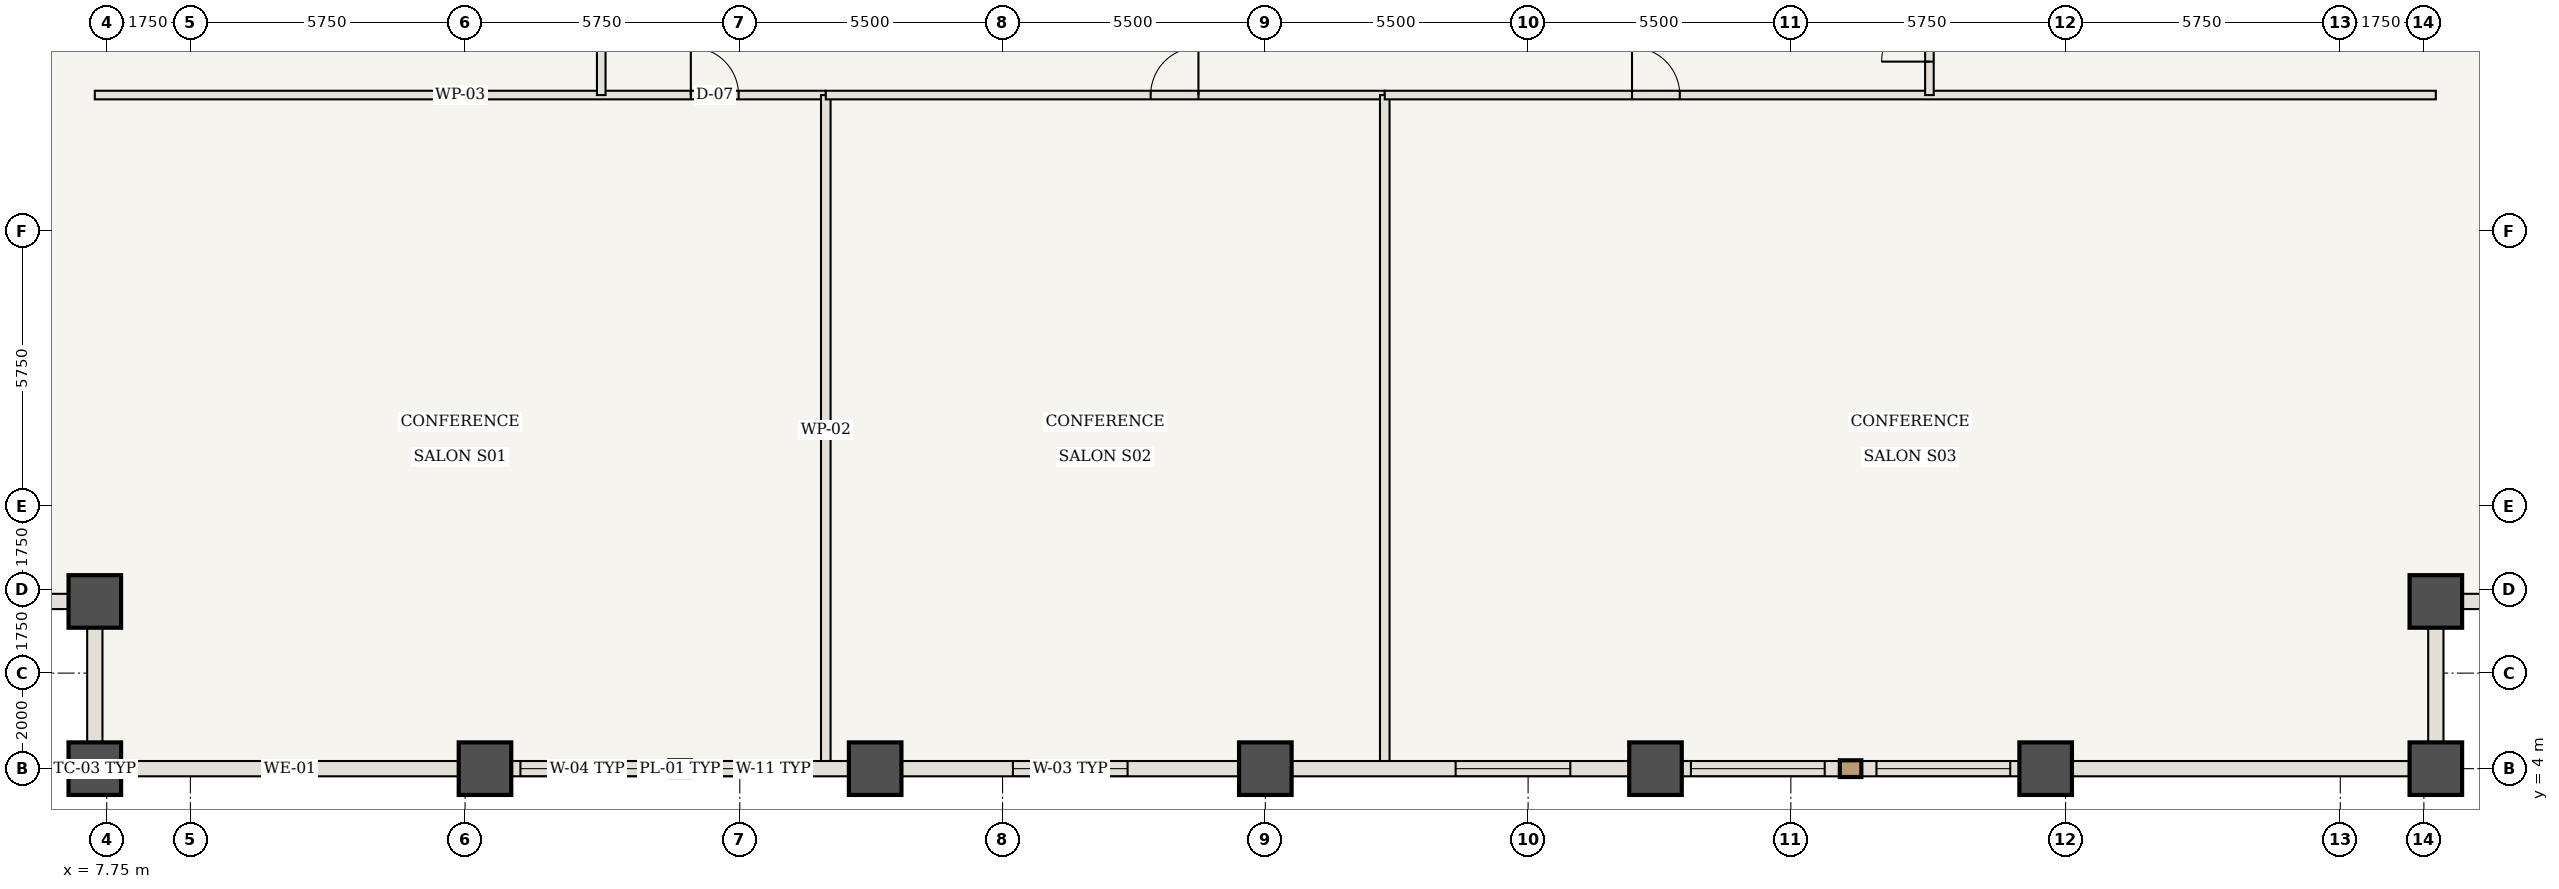
"""IFC4 building model, lengths in metres.
Left out: names, types, materials, properties, quantities, classifications, styles, units other than length and angle.
Written with IfcOpenShell. Run it as: python <this file> out.ifc"""

import sys

from ifc_helpers import new_model, si_unit, direction, frame, frame_2d, origin, origin_2d, place, context, subcontext, project, spatial, rectangle, extrude, element, fill, save


model = new_model("IFC4")
c1 = context("Model", 3, precision=1e-05, world=origin(), true_north=direction((0.0, 1.0)))
c2 = subcontext(c1, "Body", "Model", "MODEL_VIEW")
j1 = project(units=[si_unit("LENGTHUNIT", "METRE"), si_unit("PLANEANGLEUNIT", "RADIAN")], contexts=[c1])
p1 = place(None, origin())
s1 = spatial("IfcSite", under=j1, at=p1, CompositionType="ELEMENT")
p2 = place(p1, origin())
s2 = spatial("IfcBuilding", under=s1, at=p2, CompositionType="ELEMENT")
p3 = place(p2, frame((0.0, 0.0, 52.85)))
s3 = spatial("IfcBuildingStorey", under=s2, at=p3, CompositionType="ELEMENT", Elevation=52.85)
for number, where, z_axis, x_axis in (
    (1, (7.5, 4.0, 0.0), (0.0, 0.0, 1.0), (1.0, 0.0, 0.0)),
    (2, (7.5, 7.5, 0.0), (0.0, 0.0, 1.0), (1.0, 0.0, 0.0)),
    (3, (56.5, 4.0, 0.0), (0.0, 0.0, 1.0), (1.0, 0.0, 0.0)),
    (4, (56.5, 7.5, 0.0), (0.0, 0.0, 1.0), (1.0, 0.0, 0.0)),
    (5, (15.667, 4.0, 0.0), (0.0, 0.0, 1.0), (1.0, 0.0, 0.0)),
    (6, (23.833, 4.0, 0.0), (0.0, 0.0, 1.0), (1.0, 0.0, 0.0)),
    (7, (32.0, 4.0, 0.0), (0.0, 0.0, 1.0), (1.0, 0.0, 0.0)),
    (8, (40.167, 4.0, 0.0), (0.0, 0.0, 1.0), (1.0, 0.0, 0.0)),
    (9, (48.333, 4.0, 0.0), (0.0, 0.0, 1.0), (1.0, 0.0, 0.0)),
):
    element("IfcColumn", number, at=place(p3, frame(where, z_axis=z_axis, x_axis=x_axis)), inside=s3, PredefinedType="COLUMN", context=c2, shape_type="SweptSolid", body=[
        extrude(rectangle(XDim=1.1, YDim=1.1, at=origin_2d()), origin(), (0.0, 0.0, 1.0), 3.5),
    ])
p4 = place(p3, frame((7.5, 18.1, 0.0), z_axis=(0.0, 0.0, 1.0), x_axis=(1.0, 0.0, 0.0)))
e10 = element("IfcWall", 10, at=p4, inside=s3, PredefinedType="STANDARD", context=c2, shape_type="SweptSolid", body=[
    extrude(rectangle(XDim=15.3, YDim=0.18, at=frame_2d((7.65, 0.0))), origin(), (0.0, 0.0, 1.0), 3.32),
])
p5 = place(p4, frame((12.475, 0.0, 0.0)))
e11 = element("IfcOpeningElement", 11, at=p5, cuts=e10, PredefinedType="OPENING", context=c2, shape_type="SweptSolid", body=[
    extrude(rectangle(XDim=1.0, YDim=2.15, at=frame_2d((0.5, 1.075))), frame((0.0, 0.1, 0.0), z_axis=(0.0, -1.0, 0.0), x_axis=(1.0, 0.0, 0.0)), (0.0, 0.0, 1.0), 0.2),
])
p6 = place(p3, frame((22.8, 4.06, 0.0), z_axis=(0.0, 0.0, 1.0), x_axis=(0.0, 1.0, 0.0)))
e12 = element("IfcWall", 12, at=p6, inside=s3, PredefinedType="STANDARD", context=c2, shape_type="SweptSolid", body=[
    extrude(rectangle(XDim=14.04, YDim=0.2, at=frame_2d((7.02, 0.0))), origin(), (0.0, 0.0, 1.0), 3.32),
])
p7 = place(p3, frame((22.8, 18.1, 0.0), z_axis=(0.0, 0.0, 1.0), x_axis=(1.0, 0.0, 0.0)))
e13 = element("IfcWall", 13, at=p7, inside=s3, PredefinedType="STANDARD", context=c2, shape_type="SweptSolid", body=[
    extrude(rectangle(XDim=11.7, YDim=0.18, at=frame_2d((5.85, 0.0))), origin(), (0.0, 0.0, 1.0), 3.32),
])
p8 = place(p7, frame((6.8, 0.0, 0.0)))
e14 = element("IfcOpeningElement", 14, at=p8, cuts=e13, PredefinedType="OPENING", context=c2, shape_type="SweptSolid", body=[
    extrude(rectangle(XDim=1.0, YDim=2.15, at=frame_2d((0.5, 1.075))), frame((0.0, 0.1, 0.0), z_axis=(0.0, -1.0, 0.0), x_axis=(1.0, 0.0, 0.0)), (0.0, 0.0, 1.0), 0.2),
])
p9 = place(p3, frame((34.5, 4.06, 0.0), z_axis=(0.0, 0.0, 1.0), x_axis=(0.0, 1.0, 0.0)))
e15 = element("IfcWall", 15, at=p9, inside=s3, PredefinedType="STANDARD", context=c2, shape_type="SweptSolid", body=[
    extrude(rectangle(XDim=14.04, YDim=0.2, at=frame_2d((7.02, 0.0))), origin(), (0.0, 0.0, 1.0), 3.32),
])
p10 = place(p3, frame((34.5, 18.1, 0.0), z_axis=(0.0, 0.0, 1.0), x_axis=(1.0, 0.0, 0.0)))
e16 = element("IfcWall", 16, at=p10, inside=s3, PredefinedType="STANDARD", context=c2, shape_type="SweptSolid", body=[
    extrude(rectangle(XDim=22.0, YDim=0.18, at=frame_2d((11.0, 0.0))), origin(), (0.0, 0.0, 1.0), 3.32),
])
p11 = place(p10, frame((5.175, 0.0, 0.0)))
e17 = element("IfcOpeningElement", 17, at=p11, cuts=e16, PredefinedType="OPENING", context=c2, shape_type="SweptSolid", body=[
    extrude(rectangle(XDim=1.0, YDim=2.15, at=frame_2d((0.5, 1.075))), frame((0.0, 0.1, 0.0), z_axis=(0.0, -1.0, 0.0), x_axis=(1.0, 0.0, 0.0)), (0.0, 0.0, 1.0), 0.2),
])
p12 = place(p3, frame((18.1, 18.1, 0.0), z_axis=(0.0, 0.0, 1.0), x_axis=(0.0, 1.0, 0.0)))
e18 = element("IfcWall", 18, at=p12, inside=s3, PredefinedType="STANDARD", context=c2, shape_type="SweptSolid", body=[
    extrude(rectangle(XDim=10.9, YDim=0.18, at=frame_2d((5.45, 0.0))), origin(), (0.0, 0.0, 1.0), 3.32),
])
p13 = place(p12, frame((4.95, 0.0, 0.0)))
e19 = element("IfcOpeningElement", 19, at=p13, cuts=e18, PredefinedType="OPENING", context=c2, shape_type="SweptSolid", body=[
    extrude(rectangle(XDim=1.0, YDim=2.15, at=frame_2d((0.5, 1.075))), frame((0.0, 0.1, 0.0), z_axis=(0.0, -1.0, 0.0), x_axis=(1.0, 0.0, 0.0)), (0.0, 0.0, 1.0), 0.2),
])
p14 = place(p3, frame((45.9, 18.1, 0.0), z_axis=(0.0, 0.0, 1.0), x_axis=(0.0, 1.0, 0.0)))
e20 = element("IfcWall", 20, at=p14, inside=s3, PredefinedType="STANDARD", context=c2, shape_type="SweptSolid", body=[
    extrude(rectangle(XDim=5.3, YDim=0.18, at=frame_2d((2.65, 0.0))), origin(), (0.0, 0.0, 1.0), 3.32),
])
p15 = place(p14, frame((0.7, 0.0, 0.0)))
e21 = element("IfcOpeningElement", 21, at=p15, cuts=e20, PredefinedType="OPENING", context=c2, shape_type="SweptSolid", body=[
    extrude(rectangle(XDim=1.0, YDim=2.15, at=frame_2d((0.5, 1.075))), frame((0.0, 0.1, 0.0), z_axis=(0.0, -1.0, 0.0), x_axis=(1.0, 0.0, 0.0)), (0.0, 0.0, 1.0), 0.2),
])
p16 = place(p3, frame((15.667, 4.0, 0.0), z_axis=(0.0, 0.0, 1.0), x_axis=(-1.0, 0.0, 0.0)))
e22 = element("IfcWall", 22, at=p16, inside=s3, PredefinedType="USERDEFINED", context=c2, shape_type="SweptSolid", body=[
    extrude(rectangle(XDim=8.167, YDim=0.32, at=frame_2d((4.083, 0.0))), origin(), (0.0, 0.0, 1.0), 2.52),
])
p17 = place(p3, frame((23.833, 4.0, 0.0), z_axis=(0.0, 0.0, 1.0), x_axis=(-1.0, 0.0, 0.0)))
e23 = element("IfcWall", 23, at=p17, inside=s3, PredefinedType="USERDEFINED", context=c2, shape_type="SweptSolid", body=[
    extrude(rectangle(XDim=8.167, YDim=0.32, at=frame_2d((4.083, 0.0))), origin(), (0.0, 0.0, 1.0), 2.52),
])
p18 = place(p17, frame((1.708, 0.0, 0.85)))
e24 = element("IfcOpeningElement", 24, at=p18, cuts=e23, PredefinedType="OPENING", context=c2, shape_type="SweptSolid", body=[
    extrude(rectangle(XDim=1.6, YDim=1.47, at=frame_2d((0.8, 0.735))), frame((0.0, 0.17, 0.0), z_axis=(0.0, -1.0, 0.0), x_axis=(1.0, 0.0, 0.0)), (0.0, 0.0, 1.0), 0.34),
])
p19 = place(p17, frame((4.625, 0.0, 0.85)))
e25 = element("IfcOpeningElement", 25, at=p19, cuts=e23, PredefinedType="OPENING", context=c2, shape_type="SweptSolid", body=[
    extrude(rectangle(XDim=2.8, YDim=1.47, at=frame_2d((1.4, 0.735))), frame((0.0, 0.17, 0.0), z_axis=(0.0, -1.0, 0.0), x_axis=(1.0, 0.0, 0.0)), (0.0, 0.0, 1.0), 0.34),
])
p20 = place(p3, frame((32.0, 4.0, 0.0), z_axis=(0.0, 0.0, 1.0), x_axis=(-1.0, 0.0, 0.0)))
e26 = element("IfcWall", 26, at=p20, inside=s3, PredefinedType="USERDEFINED", context=c2, shape_type="SweptSolid", body=[
    extrude(rectangle(XDim=8.167, YDim=0.32, at=frame_2d((4.083, 0.0))), origin(), (0.0, 0.0, 1.0), 2.52),
])
p21 = place(p20, frame((2.883, 0.0, 0.85)))
e27 = element("IfcOpeningElement", 27, at=p21, cuts=e26, PredefinedType="OPENING", context=c2, shape_type="SweptSolid", body=[
    extrude(rectangle(XDim=2.4, YDim=1.47, at=frame_2d((1.2, 0.735))), frame((0.0, 0.17, 0.0), z_axis=(0.0, -1.0, 0.0), x_axis=(1.0, 0.0, 0.0)), (0.0, 0.0, 1.0), 0.34),
])
p22 = place(p3, frame((40.167, 4.0, 0.0), z_axis=(0.0, 0.0, 1.0), x_axis=(-1.0, 0.0, 0.0)))
e28 = element("IfcWall", 28, at=p22, inside=s3, PredefinedType="USERDEFINED", context=c2, shape_type="SweptSolid", body=[
    extrude(rectangle(XDim=8.167, YDim=0.32, at=frame_2d((4.083, 0.0))), origin(), (0.0, 0.0, 1.0), 2.52),
])
p23 = place(p22, frame((1.783, 0.0, 0.85)))
e29 = element("IfcOpeningElement", 29, at=p23, cuts=e28, PredefinedType="OPENING", context=c2, shape_type="SweptSolid", body=[
    extrude(rectangle(XDim=2.4, YDim=1.47, at=frame_2d((1.2, 0.735))), frame((0.0, 0.17, 0.0), z_axis=(0.0, -1.0, 0.0), x_axis=(1.0, 0.0, 0.0)), (0.0, 0.0, 1.0), 0.34),
])
p24 = place(p3, frame((48.333, 4.0, 0.0), z_axis=(0.0, 0.0, 1.0), x_axis=(-1.0, 0.0, 0.0)))
e30 = element("IfcWall", 30, at=p24, inside=s3, PredefinedType="USERDEFINED", context=c2, shape_type="SweptSolid", body=[
    extrude(rectangle(XDim=8.167, YDim=0.32, at=frame_2d((4.083, 0.0))), origin(), (0.0, 0.0, 1.0), 2.52),
])
p25 = place(p24, frame((0.742, 0.0, 0.85)))
e31 = element("IfcOpeningElement", 31, at=p25, cuts=e30, PredefinedType="OPENING", context=c2, shape_type="SweptSolid", body=[
    extrude(rectangle(XDim=2.8, YDim=1.47, at=frame_2d((1.4, 0.735))), frame((0.0, 0.17, 0.0), z_axis=(0.0, -1.0, 0.0), x_axis=(1.0, 0.0, 0.0)), (0.0, 0.0, 1.0), 0.34),
])
p26 = place(p24, frame((4.625, 0.0, 0.85)))
e32 = element("IfcOpeningElement", 32, at=p26, cuts=e30, PredefinedType="OPENING", context=c2, shape_type="SweptSolid", body=[
    extrude(rectangle(XDim=2.8, YDim=1.47, at=frame_2d((1.4, 0.735))), frame((0.0, 0.17, 0.0), z_axis=(0.0, -1.0, 0.0), x_axis=(1.0, 0.0, 0.0)), (0.0, 0.0, 1.0), 0.34),
])
p27 = place(p3, frame((56.5, 4.0, 0.0), z_axis=(0.0, 0.0, 1.0), x_axis=(-1.0, 0.0, 0.0)))
e33 = element("IfcWall", 33, at=p27, inside=s3, PredefinedType="USERDEFINED", context=c2, shape_type="SweptSolid", body=[
    extrude(rectangle(XDim=8.167, YDim=0.32, at=frame_2d((4.083, 0.0))), origin(), (0.0, 0.0, 1.0), 2.52),
])
for number, where, z_axis, x_axis in (
    (34, (7.5, 4.0, 0.0), (0.0, 0.0, 1.0), (0.0, 1.0, 0.0)),
    (35, (7.5, 7.5, 0.0), (0.0, 0.0, 1.0), (-1.0, 0.0, 0.0)),
    (36, (56.5, 7.5, 0.0), (0.0, 0.0, 1.0), (0.0, -1.0, 0.0)),
    (37, (60.0, 7.5, 0.0), (0.0, 0.0, 1.0), (-1.0, 0.0, 0.0)),
):
    element("IfcWall", number, at=place(p3, frame(where, z_axis=z_axis, x_axis=x_axis)), inside=s3, PredefinedType="USERDEFINED", context=c2, shape_type="SweptSolid", body=[
        extrude(rectangle(XDim=3.5, YDim=0.32, at=frame_2d((1.75, 0.0))), origin(), (0.0, 0.0, 1.0), 2.52),
    ])
p28 = place(p5, origin())
e38 = element("IfcDoor", 38, at=p28, inside=s3, OperationType="SINGLE_SWING_LEFT", PredefinedType="DOOR", context=c2, shape_type="SweptSolid", body=[
    extrude(rectangle(XDim=1.0, YDim=2.15, at=frame_2d((0.5, 1.075))), frame((0.0, 0.025, 0.0), z_axis=(0.0, -1.0, 0.0), x_axis=(1.0, 0.0, 0.0)), (0.0, 0.0, 1.0), 0.05),
])
fill(e11, e38)
p29 = place(p8, origin())
e39 = element("IfcDoor", 39, at=p29, inside=s3, OperationType="SINGLE_SWING_RIGHT", PredefinedType="DOOR", context=c2, shape_type="SweptSolid", body=[
    extrude(rectangle(XDim=1.0, YDim=2.15, at=frame_2d((0.5, 1.075))), frame((0.0, 0.025, 0.0), z_axis=(0.0, -1.0, 0.0), x_axis=(1.0, 0.0, 0.0)), (0.0, 0.0, 1.0), 0.05),
])
fill(e14, e39)
p30 = place(p11, origin())
e40 = element("IfcDoor", 40, at=p30, inside=s3, OperationType="SINGLE_SWING_LEFT", PredefinedType="DOOR", context=c2, shape_type="SweptSolid", body=[
    extrude(rectangle(XDim=1.0, YDim=2.15, at=frame_2d((0.5, 1.075))), frame((0.0, 0.025, 0.0), z_axis=(0.0, -1.0, 0.0), x_axis=(1.0, 0.0, 0.0)), (0.0, 0.0, 1.0), 0.05),
])
fill(e17, e40)
p31 = place(p15, origin())
e41 = element("IfcDoor", 41, at=p31, inside=s3, OperationType="SINGLE_SWING_LEFT", PredefinedType="DOOR", context=c2, shape_type="SweptSolid", body=[
    extrude(rectangle(XDim=1.0, YDim=2.15, at=frame_2d((0.5, 1.075))), frame((0.0, 0.025, 0.0), z_axis=(0.0, -1.0, 0.0), x_axis=(1.0, 0.0, 0.0)), (0.0, 0.0, 1.0), 0.05),
])
fill(e21, e41)
p32 = place(p18, origin())
e42 = element("IfcWindow", 42, at=p32, inside=s3, PartitioningType="SINGLE_PANEL", PredefinedType="WINDOW", context=c2, shape_type="SweptSolid", body=[
    extrude(rectangle(XDim=1.6, YDim=1.47, at=frame_2d((0.8, 0.735))), frame((0.0, 0.03, 0.0), z_axis=(0.0, -1.0, 0.0), x_axis=(1.0, 0.0, 0.0)), (0.0, 0.0, 1.0), 0.06),
])
fill(e24, e42)
p33 = place(p19, origin())
e43 = element("IfcWindow", 43, at=p33, inside=s3, PartitioningType="SINGLE_PANEL", PredefinedType="WINDOW", context=c2, shape_type="SweptSolid", body=[
    extrude(rectangle(XDim=2.8, YDim=1.47, at=frame_2d((1.4, 0.735))), frame((0.0, 0.03, 0.0), z_axis=(0.0, -1.0, 0.0), x_axis=(1.0, 0.0, 0.0)), (0.0, 0.0, 1.0), 0.06),
])
fill(e25, e43)
p34 = place(p21, origin())
e44 = element("IfcWindow", 44, at=p34, inside=s3, PartitioningType="SINGLE_PANEL", PredefinedType="WINDOW", context=c2, shape_type="SweptSolid", body=[
    extrude(rectangle(XDim=2.4, YDim=1.47, at=frame_2d((1.2, 0.735))), frame((0.0, 0.03, 0.0), z_axis=(0.0, -1.0, 0.0), x_axis=(1.0, 0.0, 0.0)), (0.0, 0.0, 1.0), 0.06),
])
fill(e27, e44)
p35 = place(p23, origin())
e45 = element("IfcWindow", 45, at=p35, inside=s3, PartitioningType="SINGLE_PANEL", PredefinedType="WINDOW", context=c2, shape_type="SweptSolid", body=[
    extrude(rectangle(XDim=2.4, YDim=1.47, at=frame_2d((1.2, 0.735))), frame((0.0, 0.03, 0.0), z_axis=(0.0, -1.0, 0.0), x_axis=(1.0, 0.0, 0.0)), (0.0, 0.0, 1.0), 0.06),
])
fill(e29, e45)
p36 = place(p25, origin())
e46 = element("IfcWindow", 46, at=p36, inside=s3, PartitioningType="SINGLE_PANEL", PredefinedType="WINDOW", context=c2, shape_type="SweptSolid", body=[
    extrude(rectangle(XDim=2.8, YDim=1.47, at=frame_2d((1.4, 0.735))), frame((0.0, 0.03, 0.0), z_axis=(0.0, -1.0, 0.0), x_axis=(1.0, 0.0, 0.0)), (0.0, 0.0, 1.0), 0.06),
])
fill(e31, e46)
p37 = place(p26, origin())
e47 = element("IfcWindow", 47, at=p37, inside=s3, PartitioningType="SINGLE_PANEL", PredefinedType="WINDOW", context=c2, shape_type="SweptSolid", body=[
    extrude(rectangle(XDim=2.8, YDim=1.47, at=frame_2d((1.4, 0.735))), frame((0.0, 0.03, 0.0), z_axis=(0.0, -1.0, 0.0), x_axis=(1.0, 0.0, 0.0)), (0.0, 0.0, 1.0), 0.06),
])
fill(e32, e47)
save(model, sys.argv[1])
